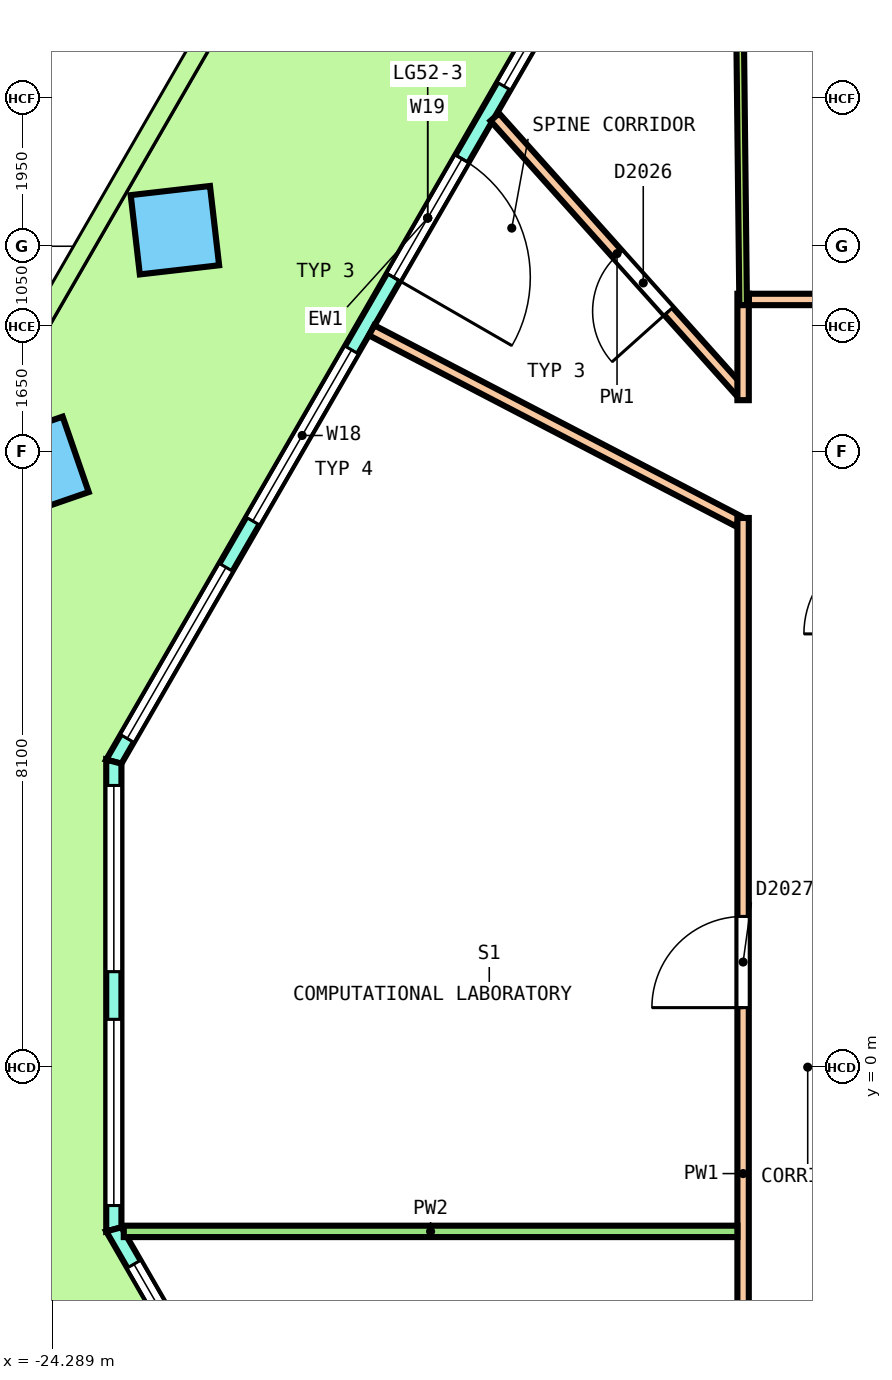
"""IFC4 building model, lengths in metres.
Left out: names, types, materials, properties, quantities, classifications, styles, units other than length and angle.
Written with IfcOpenShell. Run it as: python <this file> out.ifc"""

import sys

from ifc_helpers import new_model, si_unit, direction, frame, frame_2d, origin, origin_2d, place, context, subcontext, project, spatial, polyline, rectangle, outline, extrude, element, fill, save


model = new_model("IFC4")
c1 = context("Model", 3, precision=1e-05, world=origin(), true_north=direction((0.0, 1.0)))
c2 = subcontext(c1, "Body", "Model", "MODEL_VIEW")
j1 = project(units=[si_unit("LENGTHUNIT", "METRE"), si_unit("PLANEANGLEUNIT", "RADIAN")], contexts=[c1])
p1 = place(None, origin())
s1 = spatial("IfcSite", under=j1, at=p1, CompositionType="ELEMENT")
p2 = place(p1, origin())
s2 = spatial("IfcBuilding", under=s1, at=p2, CompositionType="ELEMENT")
p3 = place(p2, frame((0.0, 0.0, 241.4)))
s3 = spatial("IfcBuildingStorey", under=s2, at=p3, CompositionType="ELEMENT", Elevation=241.4)
p4 = place(p3, frame((-22.675, 11.011, 0.0), z_axis=(-0.025336830513, 0.018852206345, 0.999501195265), x_axis=(-0.501175751069, -0.865337958787, 0.003617128936)))
e1 = element("IfcColumn", 1, at=p4, inside=s3, PredefinedType="COLUMN", context=c2, shape_type="SweptSolid", body=[
    extrude(rectangle(XDim=1.05, YDim=1.05, at=origin_2d()), origin(), (0.0, 0.0, 1.0), 3.652),
])
p5 = place(p3, frame((-24.477, 7.89, 0.0), z_axis=(-0.021792529504, 0.025068093754, 0.999448185917), x_axis=(-0.49894916392, -0.866563260977, 0.010855715031)))
e2 = element("IfcColumn", 2, at=p5, inside=s3, PredefinedType="COLUMN", context=c2, shape_type="SweptSolid", body=[
    extrude(rectangle(XDim=1.05, YDim=1.05, at=origin_2d()), origin(), (0.0, 0.0, 1.0), 3.652),
])
p6 = place(p3, frame((-15.22, 18.323, 0.0), z_axis=(0.0, 0.0, 1.0), x_axis=(-0.500000529106, -0.866025098304, 0.0)))
e3 = element("IfcWall", 3, at=p6, inside=s3, PredefinedType="SOLIDWALL", context=c2, shape_type="SweptSolid", body=[
    extrude(outline(polyline([(-0.027, -0.1), (1.009, -0.1), (2.044, -0.1), (3.08, -0.1), (4.116, -0.1), (5.152, -0.1), (6.187, -0.1), (7.223, -0.1), (8.259, -0.1), (9.294, -0.1), (10.33, -0.1), (11.365, -0.1), (12.401, -0.1), (13.437, -0.1), (14.473, -0.1), (15.508, -0.1), (16.544, -0.1), (16.49, 0.1), (15.461, 0.1), (14.432, 0.1), (13.403, 0.1), (12.375, 0.1), (11.345, 0.1), (10.316, 0.1), (9.288, 0.1), (8.259, 0.1), (7.229, 0.1), (6.201, 0.1), (5.172, 0.1), (4.143, 0.1), (3.114, 0.1), (2.085, 0.1), (1.056, 0.1), (0.027, 0.1), (-0.027, -0.1)])), origin(), (0.0, 0.0, 1.0), 3.7),
])
p7 = place(p6, frame((0.352, 0.0, 0.1)))
e4 = element("IfcOpeningElement", 4, at=p7, cuts=e3, PredefinedType="OPENING", context=c2, shape_type="SweptSolid", body=[
    extrude(rectangle(XDim=2.6, YDim=2.65, at=frame_2d((1.3, 1.325))), frame((0.0, 0.11, 0.0), z_axis=(0.0, -1.0, 0.0), x_axis=(1.0, 0.0, 0.0)), (0.0, 0.0, 1.0), 0.22),
])
p8 = place(p6, frame((3.655, 0.0, 0.1)))
e5 = element("IfcOpeningElement", 5, at=p8, cuts=e3, PredefinedType="OPENING", context=c2, shape_type="SweptSolid", body=[
    extrude(rectangle(XDim=2.6, YDim=2.65, at=frame_2d((1.3, 1.325))), frame((0.0, 0.11, 0.0), z_axis=(0.0, -1.0, 0.0), x_axis=(1.0, 0.0, 0.0)), (0.0, 0.0, 1.0), 0.22),
])
p9 = place(p6, frame((7.359, 0.0, 0.0)))
e6 = element("IfcOpeningElement", 6, at=p9, cuts=e3, PredefinedType="OPENING", context=c2, shape_type="SweptSolid", body=[
    extrude(rectangle(XDim=1.8, YDim=2.4, at=frame_2d((0.9, 1.2))), frame((0.0, 0.11, 0.0), z_axis=(0.0, -1.0, 0.0), x_axis=(1.0, 0.0, 0.0)), (0.0, 0.0, 1.0), 0.22),
])
p10 = place(p6, frame((7.359, 0.0, 2.55)))
e7 = element("IfcOpeningElement", 7, at=p10, cuts=e3, PredefinedType="OPENING", context=c2, shape_type="SweptSolid", body=[
    extrude(rectangle(XDim=1.8, YDim=0.2, at=frame_2d((0.9, 0.1))), frame((0.0, 0.11, 0.0), z_axis=(0.0, -1.0, 0.0), x_axis=(1.0, 0.0, 0.0)), (0.0, 0.0, 1.0), 0.22),
])
p11 = place(p6, frame((10.262, 0.0, 0.1)))
e8 = element("IfcOpeningElement", 8, at=p11, cuts=e3, PredefinedType="OPENING", context=c2, shape_type="SweptSolid", body=[
    extrude(rectangle(XDim=2.6, YDim=2.65, at=frame_2d((1.3, 1.325))), frame((0.0, 0.11, 0.0), z_axis=(0.0, -1.0, 0.0), x_axis=(1.0, 0.0, 0.0)), (0.0, 0.0, 1.0), 0.22),
])
p12 = place(p6, frame((13.565, 0.0, 0.1)))
e9 = element("IfcOpeningElement", 9, at=p12, cuts=e3, PredefinedType="OPENING", context=c2, shape_type="SweptSolid", body=[
    extrude(rectangle(XDim=2.6, YDim=2.65, at=frame_2d((1.3, 1.325))), frame((0.0, 0.11, 0.0), z_axis=(0.0, -1.0, 0.0), x_axis=(1.0, 0.0, 0.0)), (0.0, 0.0, 1.0), 0.22),
])
p13 = place(p3, frame((-23.479, 4.019, 0.0), z_axis=(0.0, 0.0, 1.0), x_axis=(0.0, -1.0, 0.0)))
e10 = element("IfcWall", 10, at=p13, inside=s3, PredefinedType="SOLIDWALL", context=c2, shape_type="SweptSolid", body=[
    extrude(outline(polyline([(-0.027, -0.1), (1.008, -0.1), (2.042, -0.1), (3.077, -0.1), (4.111, -0.1), (5.146, -0.1), (6.18, -0.1), (6.126, 0.1), (5.11, 0.1), (4.093, 0.1), (3.077, 0.1), (2.06, 0.1), (1.043, 0.1), (0.027, 0.1), (-0.027, -0.1)])), origin(), (0.0, 0.0, 1.0), 3.7),
])
p14 = place(p13, frame((0.313, 0.0, 0.1)))
e11 = element("IfcOpeningElement", 11, at=p14, cuts=e10, PredefinedType="OPENING", context=c2, shape_type="SweptSolid", body=[
    extrude(rectangle(XDim=2.45, YDim=2.65, at=frame_2d((1.225, 1.325))), frame((0.0, 0.11, 0.0), z_axis=(0.0, -1.0, 0.0), x_axis=(1.0, 0.0, 0.0)), (0.0, 0.0, 1.0), 0.22),
])
p15 = place(p13, frame((3.39, 0.0, 0.1)))
e12 = element("IfcOpeningElement", 12, at=p15, cuts=e10, PredefinedType="OPENING", context=c2, shape_type="SweptSolid", body=[
    extrude(rectangle(XDim=2.45, YDim=2.65, at=frame_2d((1.225, 1.325))), frame((0.0, 0.11, 0.0), z_axis=(0.0, -1.0, 0.0), x_axis=(1.0, 0.0, 0.0)), (0.0, 0.0, 1.0), 0.22),
])
p16 = place(p3, frame((-23.479, -2.134, 0.0), z_axis=(0.0, 0.0, 1.0), x_axis=(0.500004117472, -0.866023026548, 0.0)))
e13 = element("IfcWall", 13, at=p16, inside=s3, PredefinedType="SOLIDWALL", context=c2, shape_type="SweptSolid", body=[
    extrude(outline(polyline([(-0.027, -0.1), (1.017, -0.1), (2.061, -0.1), (3.105, -0.1), (4.149, -0.1), (5.193, -0.1), (6.237, -0.1), (7.281, -0.1), (8.325, -0.1), (9.369, -0.1), (10.414, -0.1), (11.458, -0.1), (12.501, -0.1), (13.546, -0.1), (14.59, -0.1), (15.634, -0.1), (16.678, -0.1), (17.722, -0.1), (18.766, -0.1), (19.81, -0.1), (19.756, 0.1), (18.718, 0.1), (17.679, 0.1), (16.641, 0.1), (15.603, 0.1), (14.564, 0.1), (13.526, 0.1), (12.488, 0.1), (11.449, 0.1), (10.411, 0.1), (9.372, 0.1), (8.334, 0.1), (7.295, 0.1), (6.257, 0.1), (5.219, 0.1), (4.18, 0.1), (3.142, 0.1), (2.104, 0.1), (1.065, 0.1), (0.027, 0.1), (-0.027, -0.1)])), origin(), (0.0, 0.0, 1.0), 3.7),
])
p17 = place(p16, frame((0.528, 0.0, 0.1)))
e14 = element("IfcOpeningElement", 14, at=p17, cuts=e13, PredefinedType="OPENING", context=c2, shape_type="SweptSolid", body=[
    extrude(rectangle(XDim=2.9, YDim=2.65, at=frame_2d((1.45, 1.325))), frame((0.0, 0.11, 0.0), z_axis=(0.0, -1.0, 0.0), x_axis=(1.0, 0.0, 0.0)), (0.0, 0.0, 1.0), 0.22),
])
p18 = place(p16, frame((4.485, 0.0, 0.1)))
e15 = element("IfcOpeningElement", 15, at=p18, cuts=e13, PredefinedType="OPENING", context=c2, shape_type="SweptSolid", body=[
    extrude(rectangle(XDim=2.9, YDim=2.65, at=frame_2d((1.45, 1.325))), frame((0.0, 0.11, 0.0), z_axis=(0.0, -1.0, 0.0), x_axis=(1.0, 0.0, 0.0)), (0.0, 0.0, 1.0), 0.22),
])
p19 = place(p16, frame((8.991, 0.0, 0.0)))
e16 = element("IfcOpeningElement", 16, at=p19, cuts=e13, PredefinedType="OPENING", context=c2, shape_type="SweptSolid", body=[
    extrude(rectangle(XDim=1.8, YDim=2.4, at=frame_2d((0.9, 1.2))), frame((0.0, 0.11, 0.0), z_axis=(0.0, -1.0, 0.0), x_axis=(1.0, 0.0, 0.0)), (0.0, 0.0, 1.0), 0.22),
])
p20 = place(p16, frame((8.991, 0.0, 2.55)))
e17 = element("IfcOpeningElement", 17, at=p20, cuts=e13, PredefinedType="OPENING", context=c2, shape_type="SweptSolid", body=[
    extrude(rectangle(XDim=1.8, YDim=0.2, at=frame_2d((0.9, 0.1))), frame((0.0, 0.11, 0.0), z_axis=(0.0, -1.0, 0.0), x_axis=(1.0, 0.0, 0.0)), (0.0, 0.0, 1.0), 0.22),
])
p21 = place(p16, frame((12.398, 0.0, 0.1)))
e18 = element("IfcOpeningElement", 18, at=p21, cuts=e13, PredefinedType="OPENING", context=c2, shape_type="SweptSolid", body=[
    extrude(rectangle(XDim=2.9, YDim=2.65, at=frame_2d((1.45, 1.325))), frame((0.0, 0.11, 0.0), z_axis=(0.0, -1.0, 0.0), x_axis=(1.0, 0.0, 0.0)), (0.0, 0.0, 1.0), 0.22),
])
p22 = place(p16, frame((16.355, 0.0, 0.1)))
e19 = element("IfcOpeningElement", 19, at=p22, cuts=e13, PredefinedType="OPENING", context=c2, shape_type="SweptSolid", body=[
    extrude(rectangle(XDim=2.9, YDim=2.65, at=frame_2d((1.45, 1.325))), frame((0.0, 0.11, 0.0), z_axis=(0.0, -1.0, 0.0), x_axis=(1.0, 0.0, 0.0)), (0.0, 0.0, 1.0), 0.22),
])
p23 = place(p3, frame((-18.467, 12.5, 0.0), z_axis=(0.0, 0.0, 1.0), x_axis=(0.667001980811, -0.745055942594, 0.0)))
e20 = element("IfcWall", 20, at=p23, inside=s3, PredefinedType="PARTITIONING", context=c2, shape_type="SweptSolid", body=[
    extrude(rectangle(XDim=4.823, YDim=0.15, at=frame_2d((2.412, 0.0))), origin(), (0.0, 0.0, 1.0), 2.8),
])
p24 = place(p23, frame((2.429, 0.0, 0.0)))
e21 = element("IfcOpeningElement", 21, at=p24, cuts=e20, PredefinedType="OPENING", context=c2, shape_type="SweptSolid", body=[
    extrude(rectangle(XDim=1.0, YDim=2.1, at=frame_2d((0.5, 1.05))), frame((0.0, 0.085, 0.0), z_axis=(0.0, -1.0, 0.0), x_axis=(1.0, 0.0, 0.0)), (0.0, 0.0, 1.0), 0.17),
])
p25 = place(p3, frame((-20.087, 9.694, 0.0), z_axis=(0.0, 0.0, 1.0), x_axis=(0.887012228778, -0.461745932303, 0.0)))
e22 = element("IfcWall", 22, at=p25, inside=s3, PredefinedType="PARTITIONING", context=c2, shape_type="SweptSolid", body=[
    extrude(rectangle(XDim=5.434, YDim=0.15, at=frame_2d((2.717, 0.0))), origin(), (0.0, 0.0, 1.0), 2.8),
])
p26 = place(p3, frame((-15.125, 10.1, 0.0), z_axis=(0.0, 0.0, 1.0), x_axis=(1.0, 0.0, 0.0)))
e23 = element("IfcWall", 23, at=p26, inside=s3, PredefinedType="PARTITIONING", context=c2, shape_type="SweptSolid", body=[
    extrude(rectangle(XDim=30.275, YDim=0.15, at=frame_2d((15.137, 0.0))), origin(), (0.0, 0.0, 1.0), 2.8),
])
p27 = place(p26, frame((28.08, 0.0, 0.0)))
e24 = element("IfcOpeningElement", 24, at=p27, cuts=e23, PredefinedType="OPENING", context=c2, shape_type="SweptSolid", body=[
    extrude(rectangle(XDim=1.0, YDim=2.1, at=frame_2d((0.5, 1.05))), frame((0.0, 0.085, 0.0), z_axis=(0.0, -1.0, 0.0), x_axis=(1.0, 0.0, 0.0)), (0.0, 0.0, 1.0), 0.17),
])
p28 = place(p26, frame((21.143, 0.0, 0.0)))
e25 = element("IfcOpeningElement", 25, at=p28, cuts=e23, PredefinedType="OPENING", context=c2, shape_type="SweptSolid", body=[
    extrude(rectangle(XDim=1.0, YDim=2.1, at=frame_2d((0.5, 1.05))), frame((0.0, 0.085, 0.0), z_axis=(0.0, -1.0, 0.0), x_axis=(1.0, 0.0, 0.0)), (0.0, 0.0, 1.0), 0.17),
])
p29 = place(p26, frame((4.236, 0.0, 0.0)))
e26 = element("IfcOpeningElement", 26, at=p29, cuts=e23, PredefinedType="OPENING", context=c2, shape_type="SweptSolid", body=[
    extrude(rectangle(XDim=1.2, YDim=2.1, at=frame_2d((0.6, 1.05))), frame((0.0, 0.085, 0.0), z_axis=(0.0, -1.0, 0.0), x_axis=(1.0, 0.0, 0.0)), (0.0, 0.0, 1.0), 0.17),
])
p30 = place(p3, frame((-15.2, -10.025, 0.0), z_axis=(0.0, 0.0, 1.0), x_axis=(0.0, 1.0, 0.0)))
e27 = element("IfcWall", 27, at=p30, inside=s3, PredefinedType="PARTITIONING", context=c2, shape_type="SweptSolid", body=[
    extrude(rectangle(XDim=17.25, YDim=0.15, at=frame_2d((8.625, 0.0))), origin(), (0.0, 0.0, 1.0), 2.8),
])
p31 = place(p30, frame((10.808, 0.0, 0.0)))
e28 = element("IfcOpeningElement", 28, at=p31, cuts=e27, PredefinedType="OPENING", context=c2, shape_type="SweptSolid", body=[
    extrude(rectangle(XDim=1.2, YDim=2.1, at=frame_2d((0.6, 1.05))), frame((0.0, 0.085, 0.0), z_axis=(0.0, -1.0, 0.0), x_axis=(1.0, 0.0, 0.0)), (0.0, 0.0, 1.0), 0.17),
])
p32 = place(p30, frame((3.829, 0.0, 0.0)))
e29 = element("IfcOpeningElement", 29, at=p32, cuts=e27, PredefinedType="OPENING", context=c2, shape_type="SweptSolid", body=[
    extrude(rectangle(XDim=1.2, YDim=2.1, at=frame_2d((0.6, 1.05))), frame((0.0, 0.085, 0.0), z_axis=(0.0, -1.0, 0.0), x_axis=(1.0, 0.0, 0.0)), (0.0, 0.0, 1.0), 0.17),
])
p33 = place(p3, frame((-15.2, 8.775, 0.0), z_axis=(0.0, 0.0, 1.0), x_axis=(0.0, 1.0, 0.0)))
e30 = element("IfcWall", 30, at=p33, inside=s3, PredefinedType="PARTITIONING", context=c2, shape_type="SweptSolid", body=[
    extrude(rectangle(XDim=1.4, YDim=0.15, at=frame_2d((0.7, 0.0))), origin(), (0.0, 0.0, 1.0), 2.8),
])
p34 = place(p3, frame((-23.348, -2.16, 0.0), z_axis=(0.0, 0.0, 1.0), x_axis=(1.0, 0.0, 0.0)))
e31 = element("IfcWall", 31, at=p34, inside=s3, PredefinedType="PARTITIONING", context=c2, shape_type="SweptSolid", body=[
    extrude(rectangle(XDim=8.073, YDim=0.15, at=frame_2d((4.037, 0.0))), origin(), (0.0, 0.0, 1.0), 2.8),
])
p35 = place(p3, frame((-15.289, 18.004, 0.0), z_axis=(0.0, 0.0, 1.0), x_axis=(0.011228027955, -0.999936963707, 0.0)))
e32 = element("IfcWall", 32, at=p35, inside=s3, PredefinedType="PARTITIONING", context=c2, shape_type="SweptSolid", body=[
    extrude(rectangle(XDim=7.98, YDim=0.1, at=frame_2d((3.99, 0.0))), origin(), (0.0, 0.0, 1.0), 2.8),
])
p36 = place(p8, origin())
e33 = element("IfcWindow", 33, at=p36, inside=s3, PartitioningType="SINGLE_PANEL", PredefinedType="WINDOW", context=c2, shape_type="SweptSolid", body=[
    extrude(rectangle(XDim=2.6, YDim=2.65, at=frame_2d((1.3, 1.325))), frame((0.0, 0.03, 0.0), z_axis=(0.0, -1.0, 0.0), x_axis=(1.0, 0.0, 0.0)), (0.0, 0.0, 1.0), 0.06),
])
fill(e5, e33)
p37 = place(p9, origin())
e34 = element("IfcDoor", 34, at=p37, inside=s3, OperationType="DOUBLE_DOOR_SINGLE_SWING", PredefinedType="DOOR", context=c2, shape_type="SweptSolid", body=[
    extrude(rectangle(XDim=1.8, YDim=2.4, at=frame_2d((0.9, 1.2))), frame((0.0, 0.025, 0.0), z_axis=(0.0, -1.0, 0.0), x_axis=(1.0, 0.0, 0.0)), (0.0, 0.0, 1.0), 0.05),
])
fill(e6, e34)
p38 = place(p10, origin())
e35 = element("IfcWindow", 35, at=p38, inside=s3, PartitioningType="SINGLE_PANEL", PredefinedType="WINDOW", context=c2, shape_type="SweptSolid", body=[
    extrude(rectangle(XDim=1.8, YDim=0.2, at=frame_2d((0.9, 0.1))), frame((0.0, 0.03, 0.0), z_axis=(0.0, -1.0, 0.0), x_axis=(1.0, 0.0, 0.0)), (0.0, 0.0, 1.0), 0.06),
])
fill(e7, e35)
p39 = place(p11, origin())
e36 = element("IfcWindow", 36, at=p39, inside=s3, PartitioningType="SINGLE_PANEL", PredefinedType="WINDOW", context=c2, shape_type="SweptSolid", body=[
    extrude(rectangle(XDim=2.6, YDim=2.65, at=frame_2d((1.3, 1.325))), frame((0.0, 0.03, 0.0), z_axis=(0.0, -1.0, 0.0), x_axis=(1.0, 0.0, 0.0)), (0.0, 0.0, 1.0), 0.06),
])
fill(e8, e36)
p40 = place(p12, origin())
e37 = element("IfcWindow", 37, at=p40, inside=s3, PartitioningType="SINGLE_PANEL", PredefinedType="WINDOW", context=c2, shape_type="SweptSolid", body=[
    extrude(rectangle(XDim=2.6, YDim=2.65, at=frame_2d((1.3, 1.325))), frame((0.0, 0.03, 0.0), z_axis=(0.0, -1.0, 0.0), x_axis=(1.0, 0.0, 0.0)), (0.0, 0.0, 1.0), 0.06),
])
fill(e9, e37)
p41 = place(p14, origin())
e38 = element("IfcWindow", 38, at=p41, inside=s3, PartitioningType="SINGLE_PANEL", PredefinedType="WINDOW", context=c2, shape_type="SweptSolid", body=[
    extrude(rectangle(XDim=2.45, YDim=2.65, at=frame_2d((1.225, 1.325))), frame((0.0, 0.03, 0.0), z_axis=(0.0, -1.0, 0.0), x_axis=(1.0, 0.0, 0.0)), (0.0, 0.0, 1.0), 0.06),
])
fill(e11, e38)
p42 = place(p15, origin())
e39 = element("IfcWindow", 39, at=p42, inside=s3, PartitioningType="SINGLE_PANEL", PredefinedType="WINDOW", context=c2, shape_type="SweptSolid", body=[
    extrude(rectangle(XDim=2.45, YDim=2.65, at=frame_2d((1.225, 1.325))), frame((0.0, 0.03, 0.0), z_axis=(0.0, -1.0, 0.0), x_axis=(1.0, 0.0, 0.0)), (0.0, 0.0, 1.0), 0.06),
])
fill(e12, e39)
p43 = place(p17, origin())
e40 = element("IfcWindow", 40, at=p43, inside=s3, PartitioningType="SINGLE_PANEL", PredefinedType="WINDOW", context=c2, shape_type="SweptSolid", body=[
    extrude(rectangle(XDim=2.9, YDim=2.65, at=frame_2d((1.45, 1.325))), frame((0.0, 0.03, 0.0), z_axis=(0.0, -1.0, 0.0), x_axis=(1.0, 0.0, 0.0)), (0.0, 0.0, 1.0), 0.06),
])
fill(e14, e40)
p44 = place(p24, origin())
e41 = element("IfcDoor", 41, at=p44, inside=s3, OperationType="SINGLE_SWING_RIGHT", PredefinedType="DOOR", context=c2, shape_type="SweptSolid", body=[
    extrude(rectangle(XDim=1.0, YDim=2.1, at=frame_2d((0.5, 1.05))), frame((0.0, 0.025, 0.0), z_axis=(0.0, -1.0, 0.0), x_axis=(1.0, 0.0, 0.0)), (0.0, 0.0, 1.0), 0.05),
])
fill(e21, e41)
p45 = place(p31, origin())
e42 = element("IfcDoor", 42, at=p45, inside=s3, OperationType="DOUBLE_DOOR_SINGLE_SWING", PredefinedType="DOOR", context=c2, shape_type="SweptSolid", body=[
    extrude(rectangle(XDim=1.2, YDim=2.1, at=frame_2d((0.6, 1.05))), frame((0.0, 0.025, 0.0), z_axis=(0.0, -1.0, 0.0), x_axis=(1.0, 0.0, 0.0)), (0.0, 0.0, 1.0), 0.05),
])
fill(e28, e42)
save(model, sys.argv[1])
